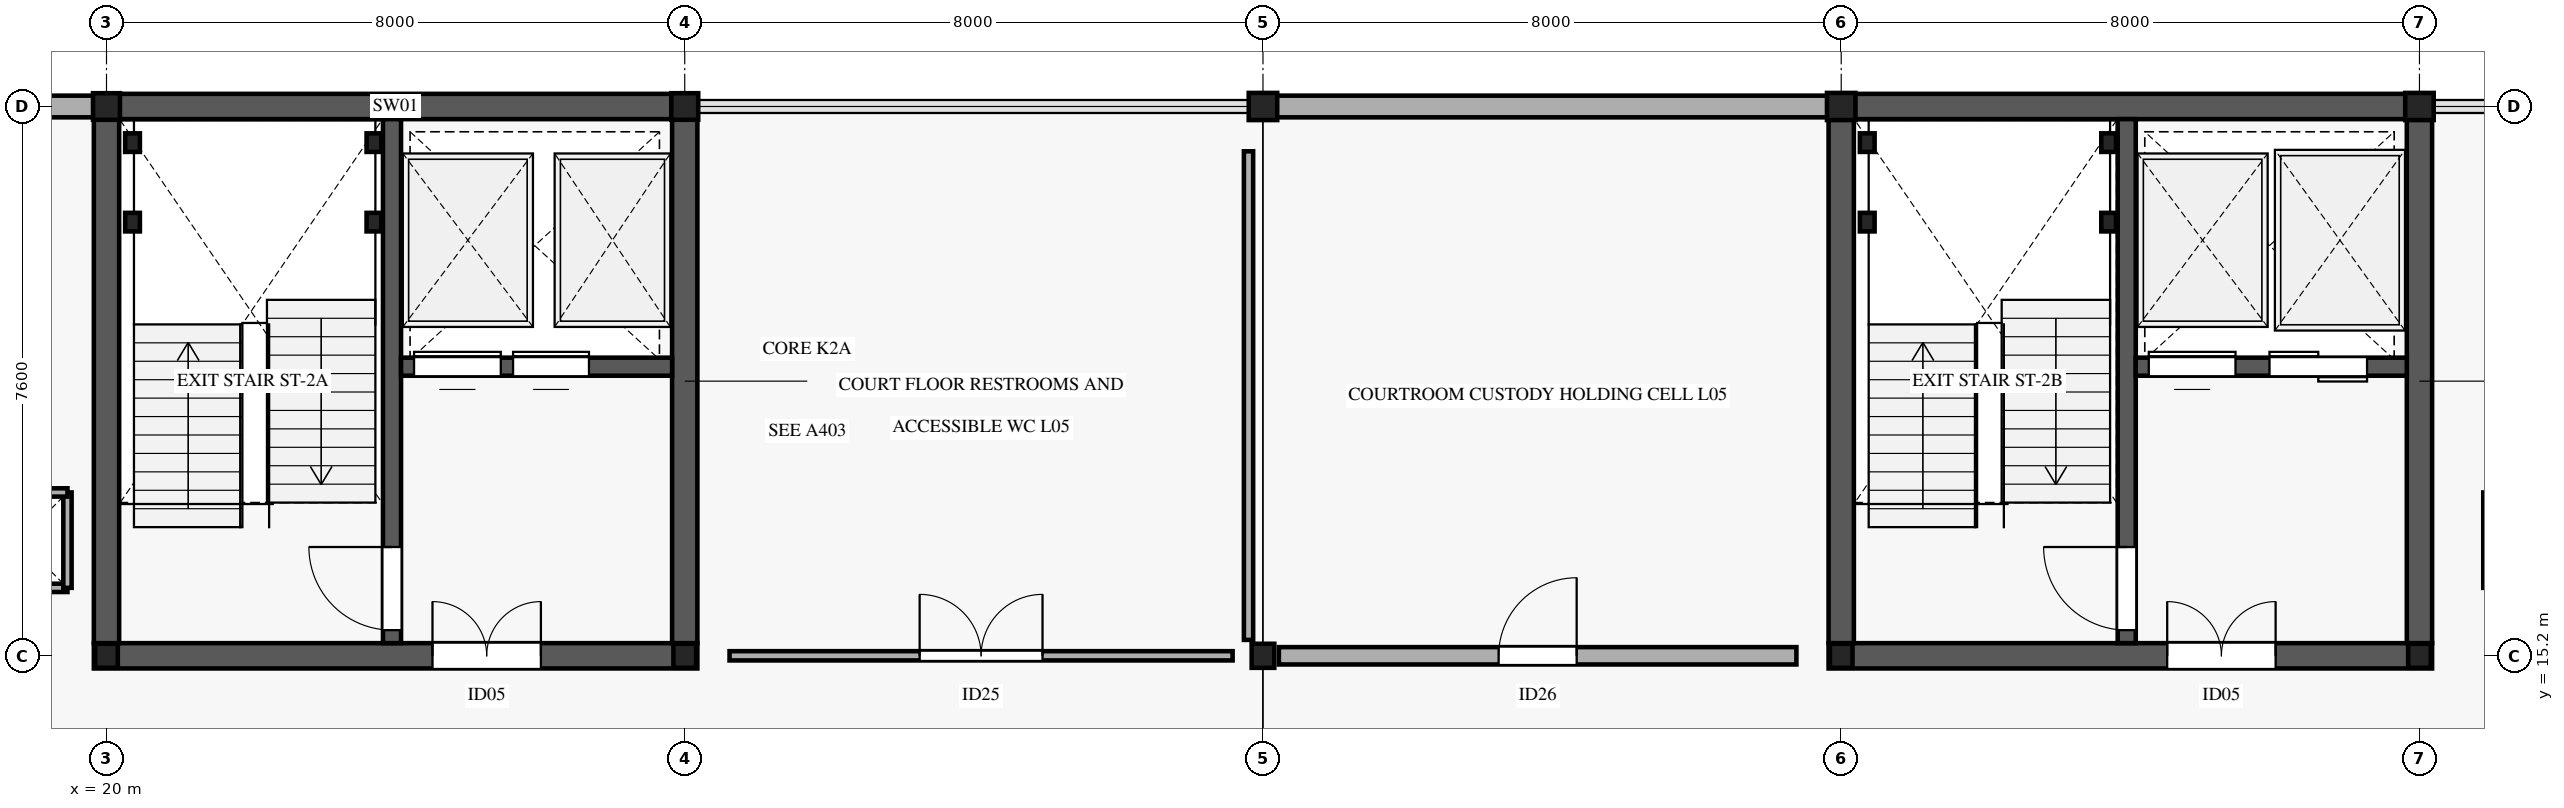
"""IFC4 building model, lengths in metres.
Left out: names, types, materials, properties, quantities, classifications, styles, units other than length and angle.
Written with IfcOpenShell. Run it as: python <this file> out.ifc"""

import sys

from ifc_helpers import new_model, si_unit, direction, frame, frame_2d, origin, origin_2d, place, context, subcontext, project, spatial, rectangle, i_section, extrude, element, fill, save


model = new_model("IFC4")
c1 = context("Model", 3, precision=1e-05, world=origin(), true_north=direction((0.0, 1.0)))
c2 = subcontext(c1, "Body", "Model", "MODEL_VIEW")
j1 = project(units=[si_unit("LENGTHUNIT", "METRE"), si_unit("PLANEANGLEUNIT", "RADIAN")], contexts=[c1])
p1 = place(None, origin())
s1 = spatial("IfcSite", under=j1, at=p1, CompositionType="ELEMENT")
p2 = place(p1, origin())
s2 = spatial("IfcBuilding", under=s1, at=p2, CompositionType="ELEMENT")
p3 = place(p2, frame((0.0, 0.0, 25.2)))
s3 = spatial("IfcBuildingStorey", under=s2, at=p3, CompositionType="ELEMENT", Elevation=25.2)
p4 = place(p3, frame((20.0, 15.2, 0.0), z_axis=(0.0, 0.0, 1.0), x_axis=(1.0, 0.0, 0.0)))
e1 = element("IfcColumn", 1, at=p4, inside=s3, PredefinedType="COLUMN", context=c2, shape_type="SweptSolid", body=[
    extrude(i_section(OverallWidth=0.313, OverallDepth=0.333, WebThickness=0.018, FlangeThickness=0.028, FilletRadius=0.015, at=origin_2d()), origin(), (0.0, 0.0, 1.0), 3.995),
])
p5 = place(p3, frame((20.0, 22.8, 0.0), z_axis=(0.0, 0.0, 1.0), x_axis=(1.0, 0.0, 0.0)))
e2 = element("IfcColumn", 2, at=p5, inside=s3, PredefinedType="COLUMN", context=c2, shape_type="SweptSolid", body=[
    extrude(i_section(OverallWidth=0.373, OverallDepth=0.368, WebThickness=0.015, FlangeThickness=0.024, FilletRadius=0.015, at=origin_2d()), origin(), (0.0, 0.0, 1.0), 3.995),
])
p6 = place(p3, frame((28.0, 15.2, 0.0), z_axis=(0.0, 0.0, 1.0), x_axis=(1.0, 0.0, 0.0)))
e3 = element("IfcColumn", 3, at=p6, inside=s3, PredefinedType="COLUMN", context=c2, shape_type="SweptSolid", body=[
    extrude(i_section(OverallWidth=0.313, OverallDepth=0.333, WebThickness=0.018, FlangeThickness=0.028, FilletRadius=0.015, at=origin_2d()), origin(), (0.0, 0.0, 1.0), 3.995),
])
p7 = place(p3, frame((28.0, 22.8, 0.0), z_axis=(0.0, 0.0, 1.0), x_axis=(1.0, 0.0, 0.0)))
e4 = element("IfcColumn", 4, at=p7, inside=s3, PredefinedType="COLUMN", context=c2, shape_type="SweptSolid", body=[
    extrude(i_section(OverallWidth=0.373, OverallDepth=0.368, WebThickness=0.015, FlangeThickness=0.024, FilletRadius=0.015, at=origin_2d()), origin(), (0.0, 0.0, 1.0), 3.995),
])
p8 = place(p3, frame((36.0, 15.2, 0.0), z_axis=(0.0, 0.0, 1.0), x_axis=(1.0, 0.0, 0.0)))
e5 = element("IfcColumn", 5, at=p8, inside=s3, PredefinedType="COLUMN", context=c2, shape_type="SweptSolid", body=[
    extrude(i_section(OverallWidth=0.313, OverallDepth=0.333, WebThickness=0.018, FlangeThickness=0.028, FilletRadius=0.015, at=origin_2d()), origin(), (0.0, 0.0, 1.0), 3.995),
])
p9 = place(p3, frame((36.0, 22.8, 0.0), z_axis=(0.0, 0.0, 1.0), x_axis=(1.0, 0.0, 0.0)))
e6 = element("IfcColumn", 6, at=p9, inside=s3, PredefinedType="COLUMN", context=c2, shape_type="SweptSolid", body=[
    extrude(i_section(OverallWidth=0.394, OverallDepth=0.376, WebThickness=0.017, FlangeThickness=0.028, FilletRadius=0.015, at=origin_2d()), origin(), (0.0, 0.0, 1.0), 3.995),
])
p10 = place(p3, frame((44.0, 15.2, 0.0), z_axis=(0.0, 0.0, 1.0), x_axis=(1.0, 0.0, 0.0)))
e7 = element("IfcColumn", 7, at=p10, inside=s3, PredefinedType="COLUMN", context=c2, shape_type="SweptSolid", body=[
    extrude(i_section(OverallWidth=0.313, OverallDepth=0.333, WebThickness=0.018, FlangeThickness=0.028, FilletRadius=0.015, at=origin_2d()), origin(), (0.0, 0.0, 1.0), 3.995),
])
p11 = place(p3, frame((44.0, 22.8, 0.0), z_axis=(0.0, 0.0, 1.0), x_axis=(1.0, 0.0, 0.0)))
e8 = element("IfcColumn", 8, at=p11, inside=s3, PredefinedType="COLUMN", context=c2, shape_type="SweptSolid", body=[
    extrude(i_section(OverallWidth=0.394, OverallDepth=0.376, WebThickness=0.017, FlangeThickness=0.028, FilletRadius=0.015, at=origin_2d()), origin(), (0.0, 0.0, 1.0), 3.995),
])
p12 = place(p3, frame((52.0, 15.2, 0.0), z_axis=(0.0, 0.0, 1.0), x_axis=(1.0, 0.0, 0.0)))
e9 = element("IfcColumn", 9, at=p12, inside=s3, PredefinedType="COLUMN", context=c2, shape_type="SweptSolid", body=[
    extrude(i_section(OverallWidth=0.313, OverallDepth=0.333, WebThickness=0.018, FlangeThickness=0.028, FilletRadius=0.015, at=origin_2d()), origin(), (0.0, 0.0, 1.0), 3.995),
])
p13 = place(p3, frame((52.0, 22.8, 0.0), z_axis=(0.0, 0.0, 1.0), x_axis=(1.0, 0.0, 0.0)))
e10 = element("IfcColumn", 10, at=p13, inside=s3, PredefinedType="COLUMN", context=c2, shape_type="SweptSolid", body=[
    extrude(i_section(OverallWidth=0.394, OverallDepth=0.376, WebThickness=0.017, FlangeThickness=0.028, FilletRadius=0.015, at=origin_2d()), origin(), (0.0, 0.0, 1.0), 3.995),
])
for number, where, z_axis, x_axis in (
    (11, (11.98, 22.8, 0.0), (0.0, 0.0, 1.0), (1.0, 0.0, 0.0)),
    (12, (35.98, 22.8, 0.0), (0.0, 0.0, 1.0), (1.0, 0.0, 0.0)),
):
    element("IfcWall", number, at=place(p3, frame(where, z_axis=z_axis, x_axis=x_axis)), inside=s3, PredefinedType="STANDARD", context=c2, shape_type="SweptSolid", body=[
        extrude(rectangle(XDim=8.04, YDim=0.3, at=frame_2d((4.02, 0.0))), origin(), (0.0, 0.0, 1.0), 3.06),
    ])
for number, where, z_axis, x_axis in (
    (13, (18.14, 16.14, 0.0), (0.0, 0.0, 1.0), (1.0, 0.0, 0.0)),
    (14, (19.46, 16.14, 0.0), (0.0, 0.0, 1.0), (0.0, 1.0, 0.0)),
    (15, (19.46, 17.46, 0.0), (0.0, 0.0, 1.0), (-1.0, 0.0, 0.0)),
    (16, (52.94, 17.46, 0.0), (0.0, 0.0, 1.0), (0.0, -1.0, 0.0)),
):
    element("IfcWall", number, at=place(p3, frame(where, z_axis=z_axis, x_axis=x_axis)), inside=s3, PredefinedType="PARTITIONING", context=c2, shape_type="SweptSolid", body=[
        extrude(rectangle(XDim=1.32, YDim=0.115, at=frame_2d((0.66, 0.0))), origin(), (0.0, 0.0, 1.0), 3.15),
    ])
p14 = place(p3, frame((19.825, 15.2, 0.0), z_axis=(0.0, 0.0, 1.0), x_axis=(1.0, 0.0, 0.0)))
e17 = element("IfcWall", 17, at=p14, inside=s3, PredefinedType="SHEAR", context=c2, shape_type="SweptSolid", body=[
    extrude(rectangle(XDim=8.35, YDim=0.35, at=frame_2d((4.175, 0.0))), origin(), (0.0, 0.0, 1.0), 3.99),
])
p15 = place(p14, frame((4.685, 0.0, 0.0)))
e18 = element("IfcOpeningElement", 18, at=p15, cuts=e17, PredefinedType="OPENING", context=c2, shape_type="SweptSolid", body=[
    extrude(rectangle(XDim=1.5, YDim=2.2, at=frame_2d((0.75, 1.1))), frame((0.0, 0.185, 0.0), z_axis=(0.0, -1.0, 0.0), x_axis=(1.0, 0.0, 0.0)), (0.0, 0.0, 1.0), 0.37),
])
p16 = place(p3, frame((19.825, 22.8, 0.0), z_axis=(0.0, 0.0, 1.0), x_axis=(1.0, 0.0, 0.0)))
e19 = element("IfcWall", 19, at=p16, inside=s3, PredefinedType="SHEAR", context=c2, shape_type="SweptSolid", body=[
    extrude(rectangle(XDim=8.35, YDim=0.35, at=frame_2d((4.175, 0.0))), origin(), (0.0, 0.0, 1.0), 3.99),
])
for number, where, z_axis, x_axis in (
    (20, (20.0, 15.375, 0.0), (0.0, 0.0, 1.0), (0.0, 1.0, 0.0)),
    (21, (28.0, 15.375, 0.0), (0.0, 0.0, 1.0), (0.0, 1.0, 0.0)),
):
    element("IfcWall", number, at=place(p3, frame(where, z_axis=z_axis, x_axis=x_axis)), inside=s3, PredefinedType="SHEAR", context=c2, shape_type="SweptSolid", body=[
        extrude(rectangle(XDim=7.25, YDim=0.35, at=frame_2d((3.625, 0.0))), origin(), (0.0, 0.0, 1.0), 3.99),
    ])
p17 = place(p3, frame((23.95, 15.375, 0.0), z_axis=(0.0, 0.0, 1.0), x_axis=(0.0, 1.0, 0.0)))
e22 = element("IfcWall", 22, at=p17, inside=s3, PredefinedType="SHEAR", context=c2, shape_type="SweptSolid", body=[
    extrude(rectangle(XDim=7.25, YDim=0.25, at=frame_2d((3.625, 0.0))), origin(), (0.0, 0.0, 1.0), 3.99),
])
p18 = place(p17, frame((0.18, 0.0, 0.0)))
e23 = element("IfcOpeningElement", 23, at=p18, cuts=e22, PredefinedType="OPENING", context=c2, shape_type="SweptSolid", body=[
    extrude(rectangle(XDim=1.15, YDim=2.2, at=frame_2d((0.575, 1.1))), frame((0.0, 0.135, 0.0), z_axis=(0.0, -1.0, 0.0), x_axis=(1.0, 0.0, 0.0)), (0.0, 0.0, 1.0), 0.27),
])
p19 = place(p3, frame((24.075, 19.2, 0.0), z_axis=(0.0, 0.0, 1.0), x_axis=(1.0, 0.0, 0.0)))
e24 = element("IfcWall", 24, at=p19, inside=s3, PredefinedType="SHEAR", context=c2, shape_type="SweptSolid", body=[
    extrude(rectangle(XDim=3.75, YDim=0.25, at=frame_2d((1.875, 0.0))), origin(), (0.0, 0.0, 1.0), 3.99),
])
p20 = place(p19, frame((0.18, 0.0, 0.0)))
e25 = element("IfcOpeningElement", 25, at=p20, cuts=e24, PredefinedType="OPENING", context=c2, shape_type="SweptSolid", body=[
    extrude(rectangle(XDim=1.2, YDim=2.2, at=frame_2d((0.6, 1.1))), frame((0.0, 0.135, 0.0), z_axis=(0.0, -1.0, 0.0), x_axis=(1.0, 0.0, 0.0)), (0.0, 0.0, 1.0), 0.27),
])
p21 = place(p19, frame((1.55, 0.0, 0.0)))
e26 = element("IfcOpeningElement", 26, at=p21, cuts=e24, PredefinedType="OPENING", context=c2, shape_type="SweptSolid", body=[
    extrude(rectangle(XDim=1.05, YDim=2.2, at=frame_2d((0.525, 1.1))), frame((0.0, 0.135, 0.0), z_axis=(0.0, -1.0, 0.0), x_axis=(1.0, 0.0, 0.0)), (0.0, 0.0, 1.0), 0.27),
])
for number, where, z_axis, x_axis in (
    (27, (20.36, 21.2, 0.0), (0.0, 0.0, 1.0), (1.0, 0.0, 0.0)),
    (28, (23.7, 21.2, 0.0), (0.0, 0.0, 1.0), (1.0, 0.0, 0.0)),
    (29, (20.36, 22.3, 0.0), (0.0, 0.0, 1.0), (1.0, 0.0, 0.0)),
    (30, (23.7, 22.3, 0.0), (0.0, 0.0, 1.0), (1.0, 0.0, 0.0)),
):
    element("IfcColumn", number, at=place(p3, frame(where, z_axis=z_axis, x_axis=x_axis)), inside=s3, PredefinedType="COLUMN", context=c2, shape_type="SweptSolid", body=[
        extrude(i_section(OverallWidth=0.204, OverallDepth=0.257, WebThickness=0.009, FlangeThickness=0.016, FilletRadius=0.013, at=origin_2d()), origin(), (0.0, 0.0, 1.0), 4.195),
    ])
p22 = place(p3, frame((43.825, 15.2, 0.0), z_axis=(0.0, 0.0, 1.0), x_axis=(1.0, 0.0, 0.0)))
e31 = element("IfcWall", 31, at=p22, inside=s3, PredefinedType="SHEAR", context=c2, shape_type="SweptSolid", body=[
    extrude(rectangle(XDim=8.35, YDim=0.35, at=frame_2d((4.175, 0.0))), origin(), (0.0, 0.0, 1.0), 3.99),
])
p23 = place(p22, frame((4.685, 0.0, 0.0)))
e32 = element("IfcOpeningElement", 32, at=p23, cuts=e31, PredefinedType="OPENING", context=c2, shape_type="SweptSolid", body=[
    extrude(rectangle(XDim=1.5, YDim=2.2, at=frame_2d((0.75, 1.1))), frame((0.0, 0.185, 0.0), z_axis=(0.0, -1.0, 0.0), x_axis=(1.0, 0.0, 0.0)), (0.0, 0.0, 1.0), 0.37),
])
p24 = place(p3, frame((43.825, 22.8, 0.0), z_axis=(0.0, 0.0, 1.0), x_axis=(1.0, 0.0, 0.0)))
e33 = element("IfcWall", 33, at=p24, inside=s3, PredefinedType="SHEAR", context=c2, shape_type="SweptSolid", body=[
    extrude(rectangle(XDim=8.35, YDim=0.35, at=frame_2d((4.175, 0.0))), origin(), (0.0, 0.0, 1.0), 3.99),
])
for number, where, z_axis, x_axis in (
    (34, (44.0, 15.375, 0.0), (0.0, 0.0, 1.0), (0.0, 1.0, 0.0)),
    (35, (52.0, 15.375, 0.0), (0.0, 0.0, 1.0), (0.0, 1.0, 0.0)),
):
    element("IfcWall", number, at=place(p3, frame(where, z_axis=z_axis, x_axis=x_axis)), inside=s3, PredefinedType="SHEAR", context=c2, shape_type="SweptSolid", body=[
        extrude(rectangle(XDim=7.25, YDim=0.35, at=frame_2d((3.625, 0.0))), origin(), (0.0, 0.0, 1.0), 3.99),
    ])
p25 = place(p3, frame((47.95, 15.375, 0.0), z_axis=(0.0, 0.0, 1.0), x_axis=(0.0, 1.0, 0.0)))
e36 = element("IfcWall", 36, at=p25, inside=s3, PredefinedType="SHEAR", context=c2, shape_type="SweptSolid", body=[
    extrude(rectangle(XDim=7.25, YDim=0.25, at=frame_2d((3.625, 0.0))), origin(), (0.0, 0.0, 1.0), 3.99),
])
p26 = place(p25, frame((0.18, 0.0, 0.0)))
e37 = element("IfcOpeningElement", 37, at=p26, cuts=e36, PredefinedType="OPENING", context=c2, shape_type="SweptSolid", body=[
    extrude(rectangle(XDim=1.15, YDim=2.2, at=frame_2d((0.575, 1.1))), frame((0.0, 0.135, 0.0), z_axis=(0.0, -1.0, 0.0), x_axis=(1.0, 0.0, 0.0)), (0.0, 0.0, 1.0), 0.27),
])
p27 = place(p3, frame((48.075, 19.2, 0.0), z_axis=(0.0, 0.0, 1.0), x_axis=(1.0, 0.0, 0.0)))
e38 = element("IfcWall", 38, at=p27, inside=s3, PredefinedType="SHEAR", context=c2, shape_type="SweptSolid", body=[
    extrude(rectangle(XDim=3.75, YDim=0.25, at=frame_2d((1.875, 0.0))), origin(), (0.0, 0.0, 1.0), 3.99),
])
p28 = place(p27, frame((0.18, 0.0, 0.0)))
e39 = element("IfcOpeningElement", 39, at=p28, cuts=e38, PredefinedType="OPENING", context=c2, shape_type="SweptSolid", body=[
    extrude(rectangle(XDim=1.2, YDim=2.2, at=frame_2d((0.6, 1.1))), frame((0.0, 0.135, 0.0), z_axis=(0.0, -1.0, 0.0), x_axis=(1.0, 0.0, 0.0)), (0.0, 0.0, 1.0), 0.27),
])
p29 = place(p27, frame((1.85, 0.0, 0.0)))
e40 = element("IfcOpeningElement", 40, at=p29, cuts=e38, PredefinedType="OPENING", context=c2, shape_type="SweptSolid", body=[
    extrude(rectangle(XDim=1.35, YDim=2.2, at=frame_2d((0.675, 1.1))), frame((0.0, 0.135, 0.0), z_axis=(0.0, -1.0, 0.0), x_axis=(1.0, 0.0, 0.0)), (0.0, 0.0, 1.0), 0.27),
])
for number, where, z_axis, x_axis in (
    (41, (44.36, 21.2, 0.0), (0.0, 0.0, 1.0), (1.0, 0.0, 0.0)),
    (42, (47.7, 21.2, 0.0), (0.0, 0.0, 1.0), (1.0, 0.0, 0.0)),
    (43, (44.36, 22.3, 0.0), (0.0, 0.0, 1.0), (1.0, 0.0, 0.0)),
    (44, (47.7, 22.3, 0.0), (0.0, 0.0, 1.0), (1.0, 0.0, 0.0)),
):
    element("IfcColumn", number, at=place(p3, frame(where, z_axis=z_axis, x_axis=x_axis)), inside=s3, PredefinedType="COLUMN", context=c2, shape_type="SweptSolid", body=[
        extrude(i_section(OverallWidth=0.204, OverallDepth=0.257, WebThickness=0.009, FlangeThickness=0.016, FilletRadius=0.013, at=origin_2d()), origin(), (0.0, 0.0, 1.0), 4.195),
    ])
p30 = place(p3, frame((28.62, 15.2, 0.0), z_axis=(0.0, 0.0, 1.0), x_axis=(1.0, 0.0, 0.0)))
e45 = element("IfcWall", 45, at=p30, inside=s3, PredefinedType="PARTITIONING", context=c2, shape_type="SweptSolid", body=[
    extrude(rectangle(XDim=6.96, YDim=0.128, at=frame_2d((3.48, 0.0))), origin(), (0.0, 0.0, 1.0), 2.85),
])
p31 = place(p30, frame((2.63, 0.0, 0.0)))
e46 = element("IfcOpeningElement", 46, at=p31, cuts=e45, PredefinedType="OPENING", context=c2, shape_type="SweptSolid", body=[
    extrude(rectangle(XDim=1.7, YDim=2.3, at=frame_2d((0.85, 1.15))), frame((0.0, 0.074, 0.0), z_axis=(0.0, -1.0, 0.0), x_axis=(1.0, 0.0, 0.0)), (0.0, 0.0, 1.0), 0.148),
])
p32 = place(p3, frame((35.8, 15.42, 0.0), z_axis=(0.0, 0.0, 1.0), x_axis=(0.0, 1.0, 0.0)))
e47 = element("IfcWall", 47, at=p32, inside=s3, PredefinedType="PARTITIONING", context=c2, shape_type="SweptSolid", body=[
    extrude(rectangle(XDim=6.76, YDim=0.128, at=frame_2d((3.38, 0.0))), origin(), (0.0, 0.0, 1.0), 2.85),
])
p33 = place(p3, frame((36.22, 15.2, 0.0), z_axis=(0.0, 0.0, 1.0), x_axis=(1.0, 0.0, 0.0)))
e48 = element("IfcWall", 48, at=p33, inside=s3, PredefinedType="PARTITIONING", context=c2, shape_type="SweptSolid", body=[
    extrude(rectangle(XDim=7.16, YDim=0.24, at=frame_2d((3.58, 0.0))), origin(), (0.0, 0.0, 1.0), 2.85),
])
p34 = place(p33, frame((3.04, 0.0, 0.0)))
e49 = element("IfcOpeningElement", 49, at=p34, cuts=e48, PredefinedType="OPENING", context=c2, shape_type="SweptSolid", body=[
    extrude(rectangle(XDim=1.08, YDim=2.25, at=frame_2d((0.54, 1.125))), frame((0.0, 0.13, 0.0), z_axis=(0.0, -1.0, 0.0), x_axis=(1.0, 0.0, 0.0)), (0.0, 0.0, 1.0), 0.26),
])
p35 = place(p18, origin())
e50 = element("IfcDoor", 50, at=p35, inside=s3, OperationType="SINGLE_SWING_RIGHT", PredefinedType="DOOR", context=c2, shape_type="SweptSolid", body=[
    extrude(rectangle(XDim=1.15, YDim=2.2, at=frame_2d((0.575, 1.1))), frame((0.0, 0.025, 0.0), z_axis=(0.0, -1.0, 0.0), x_axis=(1.0, 0.0, 0.0)), (0.0, 0.0, 1.0), 0.05),
])
fill(e23, e50)
p36 = place(p15, origin())
e51 = element("IfcDoor", 51, at=p36, inside=s3, OperationType="DOUBLE_DOOR_SINGLE_SWING", PredefinedType="DOOR", context=c2, shape_type="SweptSolid", body=[
    extrude(rectangle(XDim=1.5, YDim=2.2, at=frame_2d((0.75, 1.1))), frame((0.0, 0.025, 0.0), z_axis=(0.0, -1.0, 0.0), x_axis=(1.0, 0.0, 0.0)), (0.0, 0.0, 1.0), 0.05),
])
fill(e18, e51)
p37 = place(p20, origin())
e52 = element("IfcDoor", 52, at=p37, inside=s3, OperationType="SLIDING_TO_LEFT", PredefinedType="DOOR", context=c2, shape_type="SweptSolid", body=[
    extrude(rectangle(XDim=1.2, YDim=2.2, at=frame_2d((0.6, 1.1))), frame((0.0, 0.025, 0.0), z_axis=(0.0, -1.0, 0.0), x_axis=(1.0, 0.0, 0.0)), (0.0, 0.0, 1.0), 0.05),
])
fill(e25, e52)
p38 = place(p21, origin())
e53 = element("IfcDoor", 53, at=p38, inside=s3, OperationType="SLIDING_TO_RIGHT", PredefinedType="DOOR", context=c2, shape_type="SweptSolid", body=[
    extrude(rectangle(XDim=1.05, YDim=2.2, at=frame_2d((0.525, 1.1))), frame((0.0, 0.025, 0.0), z_axis=(0.0, -1.0, 0.0), x_axis=(1.0, 0.0, 0.0)), (0.0, 0.0, 1.0), 0.05),
])
fill(e26, e53)
p39 = place(p26, origin())
e54 = element("IfcDoor", 54, at=p39, inside=s3, OperationType="SINGLE_SWING_RIGHT", PredefinedType="DOOR", context=c2, shape_type="SweptSolid", body=[
    extrude(rectangle(XDim=1.15, YDim=2.2, at=frame_2d((0.575, 1.1))), frame((0.0, 0.025, 0.0), z_axis=(0.0, -1.0, 0.0), x_axis=(1.0, 0.0, 0.0)), (0.0, 0.0, 1.0), 0.05),
])
fill(e37, e54)
p40 = place(p23, origin())
e55 = element("IfcDoor", 55, at=p40, inside=s3, OperationType="DOUBLE_DOOR_SINGLE_SWING", PredefinedType="DOOR", context=c2, shape_type="SweptSolid", body=[
    extrude(rectangle(XDim=1.5, YDim=2.2, at=frame_2d((0.75, 1.1))), frame((0.0, 0.025, 0.0), z_axis=(0.0, -1.0, 0.0), x_axis=(1.0, 0.0, 0.0)), (0.0, 0.0, 1.0), 0.05),
])
fill(e32, e55)
p41 = place(p28, origin())
e56 = element("IfcDoor", 56, at=p41, inside=s3, OperationType="SLIDING_TO_LEFT", PredefinedType="DOOR", context=c2, shape_type="SweptSolid", body=[
    extrude(rectangle(XDim=1.2, YDim=2.2, at=frame_2d((0.6, 1.1))), frame((0.0, 0.025, 0.0), z_axis=(0.0, -1.0, 0.0), x_axis=(1.0, 0.0, 0.0)), (0.0, 0.0, 1.0), 0.05),
])
fill(e39, e56)
p42 = place(p29, origin())
e57 = element("IfcDoor", 57, at=p42, inside=s3, OperationType="DOUBLE_DOOR_SLIDING", PredefinedType="DOOR", context=c2, shape_type="SweptSolid", body=[
    extrude(rectangle(XDim=1.35, YDim=2.2, at=frame_2d((0.675, 1.1))), frame((0.0, 0.025, 0.0), z_axis=(0.0, -1.0, 0.0), x_axis=(1.0, 0.0, 0.0)), (0.0, 0.0, 1.0), 0.05),
])
fill(e40, e57)
p43 = place(p31, origin())
e58 = element("IfcDoor", 58, at=p43, inside=s3, OperationType="DOUBLE_DOOR_SINGLE_SWING", PredefinedType="DOOR", context=c2, shape_type="SweptSolid", body=[
    extrude(rectangle(XDim=1.7, YDim=2.3, at=frame_2d((0.85, 1.15))), frame((0.0, 0.025, 0.0), z_axis=(0.0, -1.0, 0.0), x_axis=(1.0, 0.0, 0.0)), (0.0, 0.0, 1.0), 0.05),
])
fill(e46, e58)
p44 = place(p34, origin())
e59 = element("IfcDoor", 59, at=p44, inside=s3, OperationType="SINGLE_SWING_RIGHT", PredefinedType="DOOR", context=c2, shape_type="SweptSolid", body=[
    extrude(rectangle(XDim=1.08, YDim=2.25, at=frame_2d((0.54, 1.125))), frame((0.0, 0.025, 0.0), z_axis=(0.0, -1.0, 0.0), x_axis=(1.0, 0.0, 0.0)), (0.0, 0.0, 1.0), 0.05),
])
fill(e49, e59)
save(model, sys.argv[1])
